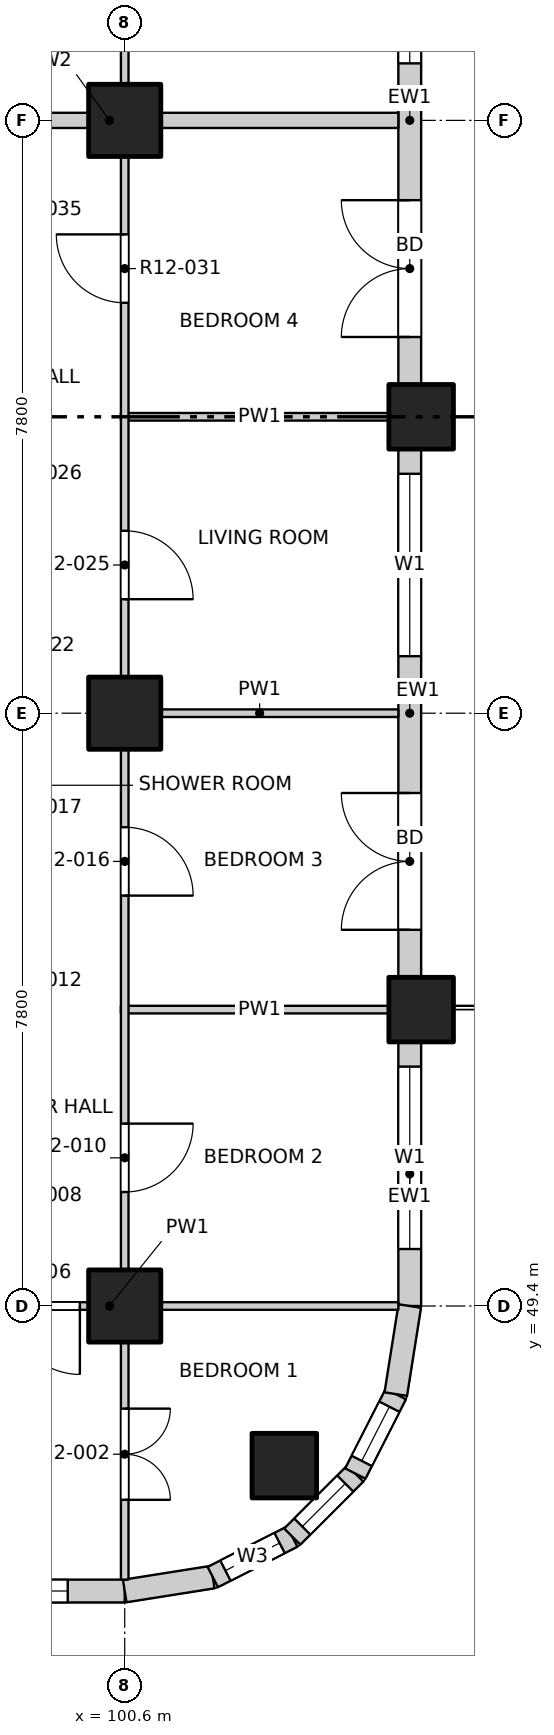
"""IFC4 building model, lengths in metres.
Left out: names, types, materials, properties, quantities, classifications, styles, units other than length and angle.
Written with IfcOpenShell. Run it as: python <this file> out.ifc"""

import sys

from ifc_helpers import new_model, si_unit, direction, frame, frame_2d, origin, origin_2d, place, context, subcontext, project, spatial, rectangle, extrude, element, fill, save


model = new_model("IFC4")
c1 = context("Model", 3, precision=1e-05, world=origin(), true_north=direction((0.0, 1.0)))
c2 = subcontext(c1, "Body", "Model", "MODEL_VIEW")
j1 = project(units=[si_unit("LENGTHUNIT", "METRE"), si_unit("PLANEANGLEUNIT", "RADIAN")], contexts=[c1])
p1 = place(None, origin())
s1 = spatial("IfcSite", under=j1, at=p1, CompositionType="ELEMENT")
p2 = place(p1, origin())
s2 = spatial("IfcBuilding", under=s1, at=p2, CompositionType="ELEMENT")
p3 = place(p2, frame((0.0, 0.0, 137.3)))
s3 = spatial("IfcBuildingStorey", under=s2, at=p3, CompositionType="ELEMENT", Elevation=137.3)
for number, where, z_axis, x_axis in (
    (1, (102.7, 47.3, -0.25), (0.0, 0.0, 1.0), (1.0, 0.0, 0.0)),
    (2, (104.5, 53.3, -0.25), (0.0, 0.0, 1.0), (1.0, 0.0, 0.0)),
    (3, (104.5, 61.1, -0.25), (0.0, 0.0, 1.0), (1.0, 0.0, 0.0)),
):
    element("IfcColumn", number, at=place(p3, frame(where, z_axis=z_axis, x_axis=x_axis)), inside=s3, PredefinedType="COLUMN", context=c2, shape_type="SweptSolid", body=[
        extrude(rectangle(XDim=0.85, YDim=0.85, at=origin_2d()), origin(), (0.0, 0.0, 1.0), 3.4),
    ])
for number, where, z_axis, x_axis in (
    (4, (100.6, 49.4, -0.25), (0.0, 0.0, 1.0), (1.0, 0.0, 0.0)),
    (5, (100.6, 57.2, -0.25), (0.0, 0.0, 1.0), (1.0, 0.0, 0.0)),
    (6, (100.6, 65.0, -0.25), (0.0, 0.0, 1.0), (1.0, 0.0, 0.0)),
):
    element("IfcColumn", number, at=place(p3, frame(where, z_axis=z_axis, x_axis=x_axis)), inside=s3, PredefinedType="COLUMN", context=c2, shape_type="SweptSolid", body=[
        extrude(rectangle(XDim=0.95, YDim=0.95, at=origin_2d()), origin(), (0.0, 0.0, 1.0), 3.4),
    ])
p4 = place(p3, frame((97.125, 45.65, 0.0), z_axis=(0.0, 0.0, 1.0), x_axis=(1.0, 0.0, 0.0)))
e7 = element("IfcWall", 7, at=p4, inside=s3, PredefinedType="SOLIDWALL", context=c2, shape_type="SweptSolid", body=[
    extrude(rectangle(XDim=3.475, YDim=0.3, at=frame_2d((1.738, 0.0))), origin(), (0.0, 0.0, 1.0), 2.7),
])
p5 = place(p4, frame((0.325, 0.0, 0.9)))
e8 = element("IfcOpeningElement", 8, at=p5, cuts=e7, PredefinedType="OPENING", context=c2, shape_type="SweptSolid", body=[
    extrude(rectangle(XDim=2.4, YDim=1.8, at=frame_2d((1.2, 0.9))), frame((0.0, 0.16, 0.0), z_axis=(0.0, -1.0, 0.0), x_axis=(1.0, 0.0, 0.0)), (0.0, 0.0, 1.0), 0.32),
])
p6 = place(p3, frame((104.35, 49.4, 0.0), z_axis=(0.0, 0.0, 1.0), x_axis=(0.0, 1.0, 0.0)))
e9 = element("IfcWall", 9, at=p6, inside=s3, PredefinedType="SOLIDWALL", context=c2, shape_type="SweptSolid", body=[
    extrude(rectangle(XDim=3.475, YDim=0.3, at=frame_2d((1.738, 0.0))), origin(), (0.0, 0.0, 1.0), 2.7),
])
p7 = place(p6, frame((0.75, 0.0, 0.9)))
e10 = element("IfcOpeningElement", 10, at=p7, cuts=e9, PredefinedType="OPENING", context=c2, shape_type="SweptSolid", body=[
    extrude(rectangle(XDim=2.4, YDim=1.8, at=frame_2d((1.2, 0.9))), frame((0.0, 0.16, 0.0), z_axis=(0.0, -1.0, 0.0), x_axis=(1.0, 0.0, 0.0)), (0.0, 0.0, 1.0), 0.32),
])
p8 = place(p3, frame((104.35, 53.725, 0.0), z_axis=(0.0, 0.0, 1.0), x_axis=(0.0, 1.0, 0.0)))
e11 = element("IfcWall", 11, at=p8, inside=s3, PredefinedType="SOLIDWALL", context=c2, shape_type="SweptSolid", body=[
    extrude(rectangle(XDim=6.95, YDim=0.3, at=frame_2d((3.475, 0.0))), origin(), (0.0, 0.0, 1.0), 2.7),
])
p9 = place(p8, frame((0.625, 0.0, 0.0)))
e12 = element("IfcOpeningElement", 12, at=p9, cuts=e11, PredefinedType="OPENING", context=c2, shape_type="SweptSolid", body=[
    extrude(rectangle(XDim=1.8, YDim=2.4, at=frame_2d((0.9, 1.2))), frame((0.0, 0.16, 0.0), z_axis=(0.0, -1.0, 0.0), x_axis=(1.0, 0.0, 0.0)), (0.0, 0.0, 1.0), 0.32),
])
p10 = place(p8, frame((4.225, 0.0, 0.9)))
e13 = element("IfcOpeningElement", 13, at=p10, cuts=e11, PredefinedType="OPENING", context=c2, shape_type="SweptSolid", body=[
    extrude(rectangle(XDim=2.4, YDim=1.8, at=frame_2d((1.2, 0.9))), frame((0.0, 0.16, 0.0), z_axis=(0.0, -1.0, 0.0), x_axis=(1.0, 0.0, 0.0)), (0.0, 0.0, 1.0), 0.32),
])
p11 = place(p3, frame((104.35, 61.525, 0.0), z_axis=(0.0, 0.0, 1.0), x_axis=(0.0, 1.0, 0.0)))
e14 = element("IfcWall", 14, at=p11, inside=s3, PredefinedType="SOLIDWALL", context=c2, shape_type="SweptSolid", body=[
    extrude(rectangle(XDim=6.95, YDim=0.3, at=frame_2d((3.475, 0.0))), origin(), (0.0, 0.0, 1.0), 2.7),
])
p12 = place(p11, frame((0.625, 0.0, 0.0)))
e15 = element("IfcOpeningElement", 15, at=p12, cuts=e14, PredefinedType="OPENING", context=c2, shape_type="SweptSolid", body=[
    extrude(rectangle(XDim=1.8, YDim=2.4, at=frame_2d((0.9, 1.2))), frame((0.0, 0.16, 0.0), z_axis=(0.0, -1.0, 0.0), x_axis=(1.0, 0.0, 0.0)), (0.0, 0.0, 1.0), 0.32),
])
p13 = place(p11, frame((4.225, 0.0, 0.9)))
e16 = element("IfcOpeningElement", 16, at=p13, cuts=e14, PredefinedType="OPENING", context=c2, shape_type="SweptSolid", body=[
    extrude(rectangle(XDim=2.4, YDim=1.8, at=frame_2d((1.2, 0.9))), frame((0.0, 0.16, 0.0), z_axis=(0.0, -1.0, 0.0), x_axis=(1.0, 0.0, 0.0)), (0.0, 0.0, 1.0), 0.32),
])
p14 = place(p3, frame((100.6, 45.65, 0.0), z_axis=(0.0, 0.0, 1.0), x_axis=(0.987678452879, 0.156496880861, 0.0)))
e17 = element("IfcWall", 17, at=p14, inside=s3, PredefinedType="SOLIDWALL", context=c2, shape_type="SweptSolid", body=[
    extrude(rectangle(XDim=1.173, YDim=0.3, at=frame_2d((0.586, 0.0))), origin(), (0.0, 0.0, 1.0), 2.7),
])
p15 = place(p3, frame((101.759, 45.833, 0.0), z_axis=(0.0, 0.0, 1.0), x_axis=(0.890988677504, 0.454025524128, 0.0)))
e18 = element("IfcWall", 18, at=p15, inside=s3, PredefinedType="SOLIDWALL", context=c2, shape_type="SweptSolid", body=[
    extrude(rectangle(XDim=1.173, YDim=0.3, at=frame_2d((0.587, 0.0))), origin(), (0.0, 0.0, 1.0), 2.7),
])
p16 = place(p15, frame((0.187, 0.0, 0.9)))
e19 = element("IfcOpeningElement", 19, at=p16, cuts=e18, PredefinedType="OPENING", context=c2, shape_type="SweptSolid", body=[
    extrude(rectangle(XDim=0.8, YDim=1.2, at=frame_2d((0.4, 0.6))), frame((0.0, 0.16, 0.0), z_axis=(0.0, -1.0, 0.0), x_axis=(1.0, 0.0, 0.0)), (0.0, 0.0, 1.0), 0.32),
])
p17 = place(p3, frame((102.804, 46.366, 0.0), z_axis=(0.0, 0.0, 1.0), x_axis=(0.707106781187, 0.707106781187, 0.0)))
e20 = element("IfcWall", 20, at=p17, inside=s3, PredefinedType="SOLIDWALL", context=c2, shape_type="SweptSolid", body=[
    extrude(rectangle(XDim=1.173, YDim=0.3, at=frame_2d((0.586, 0.0))), origin(), (0.0, 0.0, 1.0), 2.7),
])
p18 = place(p17, frame((0.187, 0.0, 0.9)))
e21 = element("IfcOpeningElement", 21, at=p18, cuts=e20, PredefinedType="OPENING", context=c2, shape_type="SweptSolid", body=[
    extrude(rectangle(XDim=0.8, YDim=1.2, at=frame_2d((0.4, 0.6))), frame((0.0, 0.16, 0.0), z_axis=(0.0, -1.0, 0.0), x_axis=(1.0, 0.0, 0.0)), (0.0, 0.0, 1.0), 0.32),
])
p19 = place(p3, frame((103.634, 47.196, 0.0), z_axis=(0.0, 0.0, 1.0), x_axis=(0.454025524128, 0.890988677504, 0.0)))
e22 = element("IfcWall", 22, at=p19, inside=s3, PredefinedType="SOLIDWALL", context=c2, shape_type="SweptSolid", body=[
    extrude(rectangle(XDim=1.173, YDim=0.3, at=frame_2d((0.587, 0.0))), origin(), (0.0, 0.0, 1.0), 2.7),
])
p20 = place(p19, frame((0.187, 0.0, 0.9)))
e23 = element("IfcOpeningElement", 23, at=p20, cuts=e22, PredefinedType="OPENING", context=c2, shape_type="SweptSolid", body=[
    extrude(rectangle(XDim=0.8, YDim=1.2, at=frame_2d((0.4, 0.6))), frame((0.0, 0.16, 0.0), z_axis=(0.0, -1.0, 0.0), x_axis=(1.0, 0.0, 0.0)), (0.0, 0.0, 1.0), 0.32),
])
p21 = place(p3, frame((104.167, 48.241, 0.0), z_axis=(0.0, 0.0, 1.0), x_axis=(0.156496880861, 0.987678452879, 0.0)))
e24 = element("IfcWall", 24, at=p21, inside=s3, PredefinedType="SOLIDWALL", context=c2, shape_type="SweptSolid", body=[
    extrude(rectangle(XDim=1.173, YDim=0.3, at=frame_2d((0.586, 0.0))), origin(), (0.0, 0.0, 1.0), 2.7),
])
p22 = place(p3, frame((96.6, 49.4, 0.0), z_axis=(0.0, 0.0, 1.0), x_axis=(1.0, 0.0, 0.0)))
e25 = element("IfcWall", 25, at=p22, inside=s3, PredefinedType="PARTITIONING", context=c2, shape_type="SweptSolid", body=[
    extrude(rectangle(XDim=7.6, YDim=0.1, at=frame_2d((3.8, 0.0))), origin(), (0.0, 0.0, 1.0), 3.15),
])
p23 = place(p22, frame((2.51, 0.0, 0.0)))
e26 = element("IfcOpeningElement", 26, at=p23, cuts=e25, PredefinedType="OPENING", context=c2, shape_type="SweptSolid", body=[
    extrude(rectangle(XDim=0.9, YDim=2.1, at=frame_2d((0.45, 1.05))), frame((0.0, 0.06, 0.0), z_axis=(0.0, -1.0, 0.0), x_axis=(1.0, 0.0, 0.0)), (0.0, 0.0, 1.0), 0.12),
])
for number, where, z_axis, x_axis in (
    (27, (100.55, 53.3, 0.0), (0.0, 0.0, 1.0), (1.0, 0.0, 0.0)),
    (28, (100.55, 57.2, 0.0), (0.0, 0.0, 1.0), (1.0, 0.0, 0.0)),
):
    element("IfcWall", number, at=place(p3, frame(where, z_axis=z_axis, x_axis=x_axis)), inside=s3, PredefinedType="PARTITIONING", context=c2, shape_type="SweptSolid", body=[
        extrude(rectangle(XDim=3.65, YDim=0.1, at=frame_2d((1.825, 0.0))), origin(), (0.0, 0.0, 1.0), 3.15),
    ])
p24 = place(p3, frame((100.55, 61.1, 0.0), z_axis=(0.0, 0.0, 1.0), x_axis=(1.0, 0.0, 0.0)))
e29 = element("IfcWall", 29, at=p24, inside=s3, PredefinedType="PARTITIONING", context=c2, shape_type="SweptSolid", body=[
    extrude(rectangle(XDim=3.65, YDim=0.1, at=frame_2d((1.825, 0.0))), origin(), (0.0, 0.0, 1.0), 2.55),
])
p25 = place(p3, frame((96.6, 65.0, 0.0), z_axis=(0.0, 0.0, 1.0), x_axis=(1.0, 0.0, 0.0)))
e30 = element("IfcWall", 30, at=p25, inside=s3, PredefinedType="PARTITIONING", context=c2, shape_type="SweptSolid", body=[
    extrude(rectangle(XDim=7.6, YDim=0.2, at=frame_2d((3.8, 0.0))), origin(), (0.0, 0.0, 1.0), 3.15),
])
p26 = place(p3, frame((100.6, 45.8, 0.0), z_axis=(0.0, 0.0, 1.0), x_axis=(0.0, 1.0, 0.0)))
e31 = element("IfcWall", 31, at=p26, inside=s3, PredefinedType="PARTITIONING", context=c2, shape_type="SweptSolid", body=[
    extrude(rectangle(XDim=38.4, YDim=0.1, at=frame_2d((19.2, 0.0))), origin(), (0.0, 0.0, 1.0), 3.15),
])
p27 = place(p26, frame((1.05, 0.0, 0.0)))
e32 = element("IfcOpeningElement", 32, at=p27, cuts=e31, PredefinedType="OPENING", context=c2, shape_type="SweptSolid", body=[
    extrude(rectangle(XDim=1.2, YDim=2.1, at=frame_2d((0.6, 1.05))), frame((0.0, 0.06, 0.0), z_axis=(0.0, -1.0, 0.0), x_axis=(1.0, 0.0, 0.0)), (0.0, 0.0, 1.0), 0.12),
])
p28 = place(p26, frame((5.1, 0.0, 0.0)))
e33 = element("IfcOpeningElement", 33, at=p28, cuts=e31, PredefinedType="OPENING", context=c2, shape_type="SweptSolid", body=[
    extrude(rectangle(XDim=0.9, YDim=2.1, at=frame_2d((0.45, 1.05))), frame((0.0, 0.06, 0.0), z_axis=(0.0, -1.0, 0.0), x_axis=(1.0, 0.0, 0.0)), (0.0, 0.0, 1.0), 0.12),
])
p29 = place(p26, frame((9.0, 0.0, 0.0)))
e34 = element("IfcOpeningElement", 34, at=p29, cuts=e31, PredefinedType="OPENING", context=c2, shape_type="SweptSolid", body=[
    extrude(rectangle(XDim=0.9, YDim=2.1, at=frame_2d((0.45, 1.05))), frame((0.0, 0.06, 0.0), z_axis=(0.0, -1.0, 0.0), x_axis=(1.0, 0.0, 0.0)), (0.0, 0.0, 1.0), 0.12),
])
p30 = place(p26, frame((12.9, 0.0, 0.0)))
e35 = element("IfcOpeningElement", 35, at=p30, cuts=e31, PredefinedType="OPENING", context=c2, shape_type="SweptSolid", body=[
    extrude(rectangle(XDim=0.9, YDim=2.1, at=frame_2d((0.45, 1.05))), frame((0.0, 0.06, 0.0), z_axis=(0.0, -1.0, 0.0), x_axis=(1.0, 0.0, 0.0)), (0.0, 0.0, 1.0), 0.12),
])
p31 = place(p26, frame((16.8, 0.0, 0.0)))
e36 = element("IfcOpeningElement", 36, at=p31, cuts=e31, PredefinedType="OPENING", context=c2, shape_type="SweptSolid", body=[
    extrude(rectangle(XDim=0.9, YDim=2.1, at=frame_2d((0.45, 1.05))), frame((0.0, 0.06, 0.0), z_axis=(0.0, -1.0, 0.0), x_axis=(1.0, 0.0, 0.0)), (0.0, 0.0, 1.0), 0.12),
])
p32 = place(p26, frame((20.7, 0.0, 0.0)))
e37 = element("IfcOpeningElement", 37, at=p32, cuts=e31, PredefinedType="OPENING", context=c2, shape_type="SweptSolid", body=[
    extrude(rectangle(XDim=0.9, YDim=2.1, at=frame_2d((0.45, 1.05))), frame((0.0, 0.06, 0.0), z_axis=(0.0, -1.0, 0.0), x_axis=(1.0, 0.0, 0.0)), (0.0, 0.0, 1.0), 0.12),
])
p33 = place(p26, frame((24.6, 0.0, 0.0)))
e38 = element("IfcOpeningElement", 38, at=p33, cuts=e31, PredefinedType="OPENING", context=c2, shape_type="SweptSolid", body=[
    extrude(rectangle(XDim=0.9, YDim=2.1, at=frame_2d((0.45, 1.05))), frame((0.0, 0.06, 0.0), z_axis=(0.0, -1.0, 0.0), x_axis=(1.0, 0.0, 0.0)), (0.0, 0.0, 1.0), 0.12),
])
p34 = place(p26, frame((28.5, 0.0, 0.0)))
e39 = element("IfcOpeningElement", 39, at=p34, cuts=e31, PredefinedType="OPENING", context=c2, shape_type="SweptSolid", body=[
    extrude(rectangle(XDim=0.9, YDim=2.1, at=frame_2d((0.45, 1.05))), frame((0.0, 0.06, 0.0), z_axis=(0.0, -1.0, 0.0), x_axis=(1.0, 0.0, 0.0)), (0.0, 0.0, 1.0), 0.12),
])
p35 = place(p26, frame((32.4, 0.0, 0.0)))
e40 = element("IfcOpeningElement", 40, at=p35, cuts=e31, PredefinedType="OPENING", context=c2, shape_type="SweptSolid", body=[
    extrude(rectangle(XDim=0.9, YDim=2.1, at=frame_2d((0.45, 1.05))), frame((0.0, 0.06, 0.0), z_axis=(0.0, -1.0, 0.0), x_axis=(1.0, 0.0, 0.0)), (0.0, 0.0, 1.0), 0.12),
])
p36 = place(p26, frame((36.15, 0.0, 0.0)))
e41 = element("IfcOpeningElement", 41, at=p36, cuts=e31, PredefinedType="OPENING", context=c2, shape_type="SweptSolid", body=[
    extrude(rectangle(XDim=1.2, YDim=2.1, at=frame_2d((0.6, 1.05))), frame((0.0, 0.06, 0.0), z_axis=(0.0, -1.0, 0.0), x_axis=(1.0, 0.0, 0.0)), (0.0, 0.0, 1.0), 0.12),
])
p37 = place(p5, origin())
e42 = element("IfcWindow", 42, at=p37, inside=s3, PartitioningType="DOUBLE_PANEL_VERTICAL", PredefinedType="WINDOW", context=c2, shape_type="SweptSolid", body=[
    extrude(rectangle(XDim=2.4, YDim=1.8, at=frame_2d((1.2, 0.9))), frame((0.0, 0.03, 0.0), z_axis=(0.0, -1.0, 0.0), x_axis=(1.0, 0.0, 0.0)), (0.0, 0.0, 1.0), 0.06),
])
fill(e8, e42)
p38 = place(p7, origin())
e43 = element("IfcWindow", 43, at=p38, inside=s3, PartitioningType="DOUBLE_PANEL_VERTICAL", PredefinedType="WINDOW", context=c2, shape_type="SweptSolid", body=[
    extrude(rectangle(XDim=2.4, YDim=1.8, at=frame_2d((1.2, 0.9))), frame((0.0, 0.03, 0.0), z_axis=(0.0, -1.0, 0.0), x_axis=(1.0, 0.0, 0.0)), (0.0, 0.0, 1.0), 0.06),
])
fill(e10, e43)
p39 = place(p9, origin())
e44 = element("IfcDoor", 44, at=p39, inside=s3, OperationType="DOUBLE_DOOR_SINGLE_SWING", PredefinedType="DOOR", context=c2, shape_type="SweptSolid", body=[
    extrude(rectangle(XDim=1.8, YDim=2.4, at=frame_2d((0.9, 1.2))), frame((0.0, 0.025, 0.0), z_axis=(0.0, -1.0, 0.0), x_axis=(1.0, 0.0, 0.0)), (0.0, 0.0, 1.0), 0.05),
])
fill(e12, e44)
p40 = place(p10, origin())
e45 = element("IfcWindow", 45, at=p40, inside=s3, PartitioningType="DOUBLE_PANEL_VERTICAL", PredefinedType="WINDOW", context=c2, shape_type="SweptSolid", body=[
    extrude(rectangle(XDim=2.4, YDim=1.8, at=frame_2d((1.2, 0.9))), frame((0.0, 0.03, 0.0), z_axis=(0.0, -1.0, 0.0), x_axis=(1.0, 0.0, 0.0)), (0.0, 0.0, 1.0), 0.06),
])
fill(e13, e45)
p41 = place(p12, origin())
e46 = element("IfcDoor", 46, at=p41, inside=s3, OperationType="DOUBLE_DOOR_SINGLE_SWING", PredefinedType="DOOR", context=c2, shape_type="SweptSolid", body=[
    extrude(rectangle(XDim=1.8, YDim=2.4, at=frame_2d((0.9, 1.2))), frame((0.0, 0.025, 0.0), z_axis=(0.0, -1.0, 0.0), x_axis=(1.0, 0.0, 0.0)), (0.0, 0.0, 1.0), 0.05),
])
fill(e15, e46)
p42 = place(p13, origin())
e47 = element("IfcWindow", 47, at=p42, inside=s3, PartitioningType="DOUBLE_PANEL_VERTICAL", PredefinedType="WINDOW", context=c2, shape_type="SweptSolid", body=[
    extrude(rectangle(XDim=2.4, YDim=1.8, at=frame_2d((1.2, 0.9))), frame((0.0, 0.03, 0.0), z_axis=(0.0, -1.0, 0.0), x_axis=(1.0, 0.0, 0.0)), (0.0, 0.0, 1.0), 0.06),
])
fill(e16, e47)
p43 = place(p16, origin())
e48 = element("IfcWindow", 48, at=p43, inside=s3, PartitioningType="SINGLE_PANEL", PredefinedType="WINDOW", context=c2, shape_type="SweptSolid", body=[
    extrude(rectangle(XDim=0.8, YDim=1.2, at=frame_2d((0.4, 0.6))), frame((0.0, 0.03, 0.0), z_axis=(0.0, -1.0, 0.0), x_axis=(1.0, 0.0, 0.0)), (0.0, 0.0, 1.0), 0.06),
])
fill(e19, e48)
p44 = place(p18, origin())
e49 = element("IfcWindow", 49, at=p44, inside=s3, PartitioningType="SINGLE_PANEL", PredefinedType="WINDOW", context=c2, shape_type="SweptSolid", body=[
    extrude(rectangle(XDim=0.8, YDim=1.2, at=frame_2d((0.4, 0.6))), frame((0.0, 0.03, 0.0), z_axis=(0.0, -1.0, 0.0), x_axis=(1.0, 0.0, 0.0)), (0.0, 0.0, 1.0), 0.06),
])
fill(e21, e49)
p45 = place(p20, origin())
e50 = element("IfcWindow", 50, at=p45, inside=s3, PartitioningType="SINGLE_PANEL", PredefinedType="WINDOW", context=c2, shape_type="SweptSolid", body=[
    extrude(rectangle(XDim=0.8, YDim=1.2, at=frame_2d((0.4, 0.6))), frame((0.0, 0.03, 0.0), z_axis=(0.0, -1.0, 0.0), x_axis=(1.0, 0.0, 0.0)), (0.0, 0.0, 1.0), 0.06),
])
fill(e23, e50)
p46 = place(p27, origin())
e51 = element("IfcDoor", 51, at=p46, inside=s3, OperationType="DOUBLE_DOOR_SINGLE_SWING", PredefinedType="DOOR", context=c2, shape_type="SweptSolid", body=[
    extrude(rectangle(XDim=1.2, YDim=2.1, at=frame_2d((0.6, 1.05))), frame((0.0, 0.025, 0.0), z_axis=(0.0, -1.0, 0.0), x_axis=(1.0, 0.0, 0.0)), (0.0, 0.0, 1.0), 0.05),
])
fill(e32, e51)
p47 = place(p23, origin())
e52 = element("IfcDoor", 52, at=p47, inside=s3, OperationType="SINGLE_SWING_LEFT", PredefinedType="DOOR", context=c2, shape_type="SweptSolid", body=[
    extrude(rectangle(XDim=0.9, YDim=2.1, at=frame_2d((0.45, 1.05))), frame((0.0, 0.025, 0.0), z_axis=(0.0, -1.0, 0.0), x_axis=(1.0, 0.0, 0.0)), (0.0, 0.0, 1.0), 0.05),
])
fill(e26, e52)
p48 = place(p28, origin())
e53 = element("IfcDoor", 53, at=p48, inside=s3, OperationType="SINGLE_SWING_LEFT", PredefinedType="DOOR", context=c2, shape_type="SweptSolid", body=[
    extrude(rectangle(XDim=0.9, YDim=2.1, at=frame_2d((0.45, 1.05))), frame((0.0, 0.025, 0.0), z_axis=(0.0, -1.0, 0.0), x_axis=(1.0, 0.0, 0.0)), (0.0, 0.0, 1.0), 0.05),
])
fill(e33, e53)
p49 = place(p29, origin())
e54 = element("IfcDoor", 54, at=p49, inside=s3, OperationType="SINGLE_SWING_RIGHT", PredefinedType="DOOR", context=c2, shape_type="SweptSolid", body=[
    extrude(rectangle(XDim=0.9, YDim=2.1, at=frame_2d((0.45, 1.05))), frame((0.0, 0.025, 0.0), z_axis=(0.0, -1.0, 0.0), x_axis=(1.0, 0.0, 0.0)), (0.0, 0.0, 1.0), 0.05),
])
fill(e34, e54)
p50 = place(p30, origin())
e55 = element("IfcDoor", 55, at=p50, inside=s3, OperationType="SINGLE_SWING_RIGHT", PredefinedType="DOOR", context=c2, shape_type="SweptSolid", body=[
    extrude(rectangle(XDim=0.9, YDim=2.1, at=frame_2d((0.45, 1.05))), frame((0.0, 0.025, 0.0), z_axis=(0.0, -1.0, 0.0), x_axis=(1.0, 0.0, 0.0)), (0.0, 0.0, 1.0), 0.05),
])
fill(e35, e55)
p51 = place(p31, origin())
e56 = element("IfcDoor", 56, at=p51, inside=s3, OperationType="SINGLE_SWING_RIGHT", PredefinedType="DOOR", context=c2, shape_type="SweptSolid", body=[
    extrude(rectangle(XDim=0.9, YDim=2.1, at=frame_2d((0.45, 1.05))), frame((0.0, 0.025, 0.0), z_axis=(0.0, -1.0, 0.0), x_axis=(1.0, 0.0, 0.0)), (0.0, 0.0, 1.0), 0.05),
])
fill(e36, e56)
save(model, sys.argv[1])
